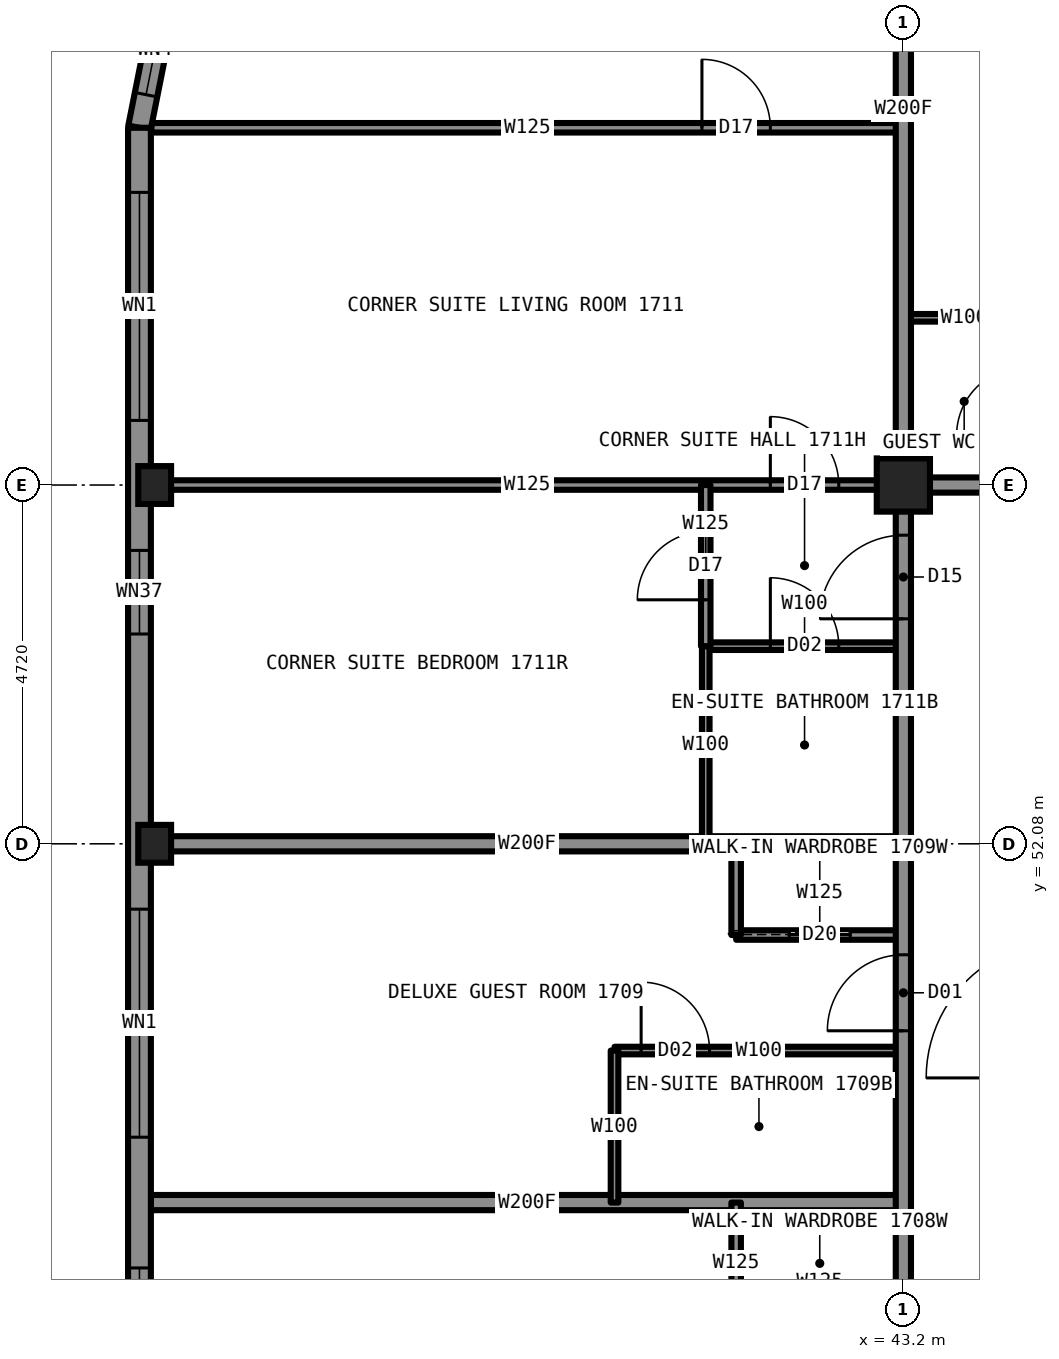
"""IFC4 building model, lengths in metres.
Left out: names, types, materials, properties, quantities, classifications, styles, units other than length and angle.
Written with IfcOpenShell. Run it as: python <this file> out.ifc"""

import sys

from ifc_helpers import new_model, si_unit, direction, frame, frame_2d, origin, origin_2d, place, context, subcontext, project, spatial, rectangle, hollow_rectangle, i_section, extrude, element, fill, save


model = new_model("IFC4")
c1 = context("Model", 3, precision=1e-05, world=origin(), true_north=direction((0.0, 1.0)))
c2 = subcontext(c1, "Body", "Model", "MODEL_VIEW")
j1 = project(units=[si_unit("LENGTHUNIT", "METRE"), si_unit("PLANEANGLEUNIT", "RADIAN")], contexts=[c1])
p1 = place(None, origin())
s1 = spatial("IfcSite", under=j1, at=p1, CompositionType="ELEMENT")
p2 = place(p1, origin())
s2 = spatial("IfcBuilding", under=s1, at=p2, CompositionType="ELEMENT")
p3 = place(p2, frame((0.0, 0.0, 60.0)))
s3 = spatial("IfcBuildingStorey", under=s2, at=p3, CompositionType="ELEMENT", Elevation=60.0)
for number, where, z_axis, x_axis in (
    (1, (33.35, 52.08, 0.0), (0.0, 0.0, 1.0), (1.0, 0.0, 0.0)),
    (2, (33.35, 56.8, 0.0), (0.0, 0.0, 1.0), (1.0, 0.0, 0.0)),
):
    element("IfcColumn", number, at=place(p3, frame(where, z_axis=z_axis, x_axis=x_axis)), inside=s3, PredefinedType="COLUMN", context=c2, shape_type="SweptSolid", body=[
        extrude(i_section(OverallWidth=0.432, OverallDepth=0.498, WebThickness=0.056, FlangeThickness=0.089, at=origin_2d()), origin(), (0.0, 0.0, 1.0), 3.5),
    ])
p4 = place(p3, frame((43.2, 56.8, 0.0), z_axis=(0.0, 0.0, 1.0), x_axis=(1.0, 0.0, 0.0)))
e3 = element("IfcColumn", 3, at=p4, inside=s3, PredefinedType="COLUMN", context=c2, shape_type="SweptSolid", body=[
    extrude(hollow_rectangle(XDim=0.7, YDim=0.7, WallThickness=0.06, at=origin_2d()), origin(), (0.0, 0.0, 1.0), 3.5),
])
p5 = place(p3, frame((43.2, 56.8, 0.0), z_axis=(0.0, 0.0, 1.0), x_axis=(1.0, 0.0, 0.0)))
e4 = element("IfcWall", 4, at=p5, inside=s3, PredefinedType="PARTITIONING", context=c2, shape_type="SweptSolid", body=[
    extrude(rectangle(XDim=23.6, YDim=0.2, at=frame_2d((11.8, 0.0))), origin(), (0.0, 0.0, 1.0), 3.33),
])
p6 = place(p5, frame((1.85, 0.0, 0.0)))
e5 = element("IfcOpeningElement", 5, at=p6, cuts=e4, PredefinedType="OPENING", context=c2, shape_type="SweptSolid", body=[
    extrude(rectangle(XDim=1.1, YDim=2.2, at=frame_2d((0.55, 1.1))), frame((0.0, 0.11, 0.0), z_axis=(0.0, -1.0, 0.0), x_axis=(1.0, 0.0, 0.0)), (0.0, 0.0, 1.0), 0.22),
])
p7 = place(p5, frame((17.16, 0.0, 0.0)))
e6 = element("IfcOpeningElement", 6, at=p7, cuts=e4, PredefinedType="OPENING", context=c2, shape_type="SweptSolid", body=[
    extrude(rectangle(XDim=1.0, YDim=2.2, at=frame_2d((0.5, 1.1))), frame((0.0, 0.11, 0.0), z_axis=(0.0, -1.0, 0.0), x_axis=(1.0, 0.0, 0.0)), (0.0, 0.0, 1.0), 0.22),
])
p8 = place(p3, frame((33.3, 56.8, 0.0), z_axis=(0.0, 0.0, 1.0), x_axis=(1.0, 0.0, 0.0)))
e7 = element("IfcWall", 7, at=p8, inside=s3, PredefinedType="PARTITIONING", context=c2, shape_type="SweptSolid", body=[
    extrude(rectangle(XDim=9.9, YDim=0.125, at=frame_2d((4.95, 0.0))), origin(), (0.0, 0.0, 1.0), 2.573),
])
p9 = place(p8, frame((8.15, 0.0, 0.0)))
e8 = element("IfcOpeningElement", 8, at=p9, cuts=e7, PredefinedType="OPENING", context=c2, shape_type="SweptSolid", body=[
    extrude(rectangle(XDim=0.9, YDim=2.2, at=frame_2d((0.45, 1.1))), frame((0.0, 0.073, 0.0), z_axis=(0.0, -1.0, 0.0), x_axis=(1.0, 0.0, 0.0)), (0.0, 0.0, 1.0), 0.145),
])
p10 = place(p3, frame((43.2, 59.0, 0.0), z_axis=(0.0, 0.0, 1.0), x_axis=(1.0, 0.0, 0.0)))
e9 = element("IfcWall", 9, at=p10, inside=s3, PredefinedType="PARTITIONING", context=c2, shape_type="SweptSolid", body=[
    extrude(rectangle(XDim=1.6, YDim=0.1, at=frame_2d((0.8, 0.0))), origin(), (0.0, 0.0, 1.0), 3.33),
])
p11 = place(p3, frame((33.306, 61.5, 0.0), z_axis=(0.0, 0.0, 1.0), x_axis=(1.0, 0.0, 0.0)))
e10 = element("IfcWall", 10, at=p11, inside=s3, PredefinedType="PARTITIONING", context=c2, shape_type="SweptSolid", body=[
    extrude(rectangle(XDim=9.894, YDim=0.125, at=frame_2d((4.947, 0.0))), origin(), (0.0, 0.0, 1.0), 3.33),
])
p12 = place(p11, frame((7.244, 0.0, 0.0)))
e11 = element("IfcOpeningElement", 11, at=p12, cuts=e10, PredefinedType="OPENING", context=c2, shape_type="SweptSolid", body=[
    extrude(rectangle(XDim=0.9, YDim=2.2, at=frame_2d((0.45, 1.1))), frame((0.0, 0.073, 0.0), z_axis=(0.0, -1.0, 0.0), x_axis=(1.0, 0.0, 0.0)), (0.0, 0.0, 1.0), 0.145),
])
p13 = place(p3, frame((33.3, 47.36, 0.0), z_axis=(0.0, 0.0, 1.0), x_axis=(1.0, 0.0, 0.0)))
e12 = element("IfcWall", 12, at=p13, inside=s3, PredefinedType="PARTITIONING", context=c2, shape_type="SweptSolid", body=[
    extrude(rectangle(XDim=9.9, YDim=0.2, at=frame_2d((4.95, 0.0))), origin(), (0.0, 0.0, 1.0), 2.723),
])
p14 = place(p3, frame((39.4, 49.36, 0.0), z_axis=(0.0, 0.0, 1.0), x_axis=(1.0, 0.0, 0.0)))
e13 = element("IfcWall", 13, at=p14, inside=s3, PredefinedType="PARTITIONING", context=c2, shape_type="SweptSolid", body=[
    extrude(rectangle(XDim=3.8, YDim=0.1, at=frame_2d((1.9, 0.0))), origin(), (0.0, 0.0, 1.0), 3.33),
])
p15 = place(p14, frame((0.35, 0.0, 0.0)))
e14 = element("IfcOpeningElement", 14, at=p15, cuts=e13, PredefinedType="OPENING", context=c2, shape_type="SweptSolid", body=[
    extrude(rectangle(XDim=0.9, YDim=2.1, at=frame_2d((0.45, 1.05))), frame((0.0, 0.06, 0.0), z_axis=(0.0, -1.0, 0.0), x_axis=(1.0, 0.0, 0.0)), (0.0, 0.0, 1.0), 0.12),
])
p16 = place(p3, frame((41.0, 50.88, 0.0), z_axis=(0.0, 0.0, 1.0), x_axis=(1.0, 0.0, 0.0)))
e15 = element("IfcWall", 15, at=p16, inside=s3, PredefinedType="PARTITIONING", context=c2, shape_type="SweptSolid", body=[
    extrude(rectangle(XDim=2.2, YDim=0.125, at=frame_2d((1.1, 0.0))), origin(), (0.0, 0.0, 1.0), 3.33),
])
p17 = place(p16, frame((0.7, 0.0, 0.0)))
e16 = element("IfcOpeningElement", 16, at=p17, cuts=e15, PredefinedType="OPENING", context=c2, shape_type="SweptSolid", body=[
    extrude(rectangle(XDim=0.8, YDim=2.1, at=frame_2d((0.4, 1.05))), frame((0.0, 0.073, 0.0), z_axis=(0.0, -1.0, 0.0), x_axis=(1.0, 0.0, 0.0)), (0.0, 0.0, 1.0), 0.145),
])
p18 = place(p3, frame((33.3, 52.08, 0.0), z_axis=(0.0, 0.0, 1.0), x_axis=(1.0, 0.0, 0.0)))
e17 = element("IfcWall", 17, at=p18, inside=s3, PredefinedType="PARTITIONING", context=c2, shape_type="SweptSolid", body=[
    extrude(rectangle(XDim=9.9, YDim=0.2, at=frame_2d((4.95, 0.0))), origin(), (0.0, 0.0, 1.0), 2.573),
])
p19 = place(p3, frame((40.6, 54.68, 0.0), z_axis=(0.0, 0.0, 1.0), x_axis=(1.0, 0.0, 0.0)))
e18 = element("IfcWall", 18, at=p19, inside=s3, PredefinedType="PARTITIONING", context=c2, shape_type="SweptSolid", body=[
    extrude(rectangle(XDim=2.6, YDim=0.1, at=frame_2d((1.3, 0.0))), origin(), (0.0, 0.0, 1.0), 3.33),
])
p20 = place(p19, frame((0.85, 0.0, 0.0)))
e19 = element("IfcOpeningElement", 19, at=p20, cuts=e18, PredefinedType="OPENING", context=c2, shape_type="SweptSolid", body=[
    extrude(rectangle(XDim=0.9, YDim=2.1, at=frame_2d((0.45, 1.05))), frame((0.0, 0.06, 0.0), z_axis=(0.0, -1.0, 0.0), x_axis=(1.0, 0.0, 0.0)), (0.0, 0.0, 1.0), 0.12),
])
p21 = place(p3, frame((43.2, 33.22, 0.0), z_axis=(0.0, 0.0, 1.0), x_axis=(0.0, 1.0, 0.0)))
e20 = element("IfcWall", 20, at=p21, inside=s3, PredefinedType="PARTITIONING", context=c2, shape_type="SweptSolid", body=[
    extrude(rectangle(XDim=23.58, YDim=0.2, at=frame_2d((11.79, 0.0))), origin(), (0.0, 0.0, 1.0), 3.33),
])
p22 = place(p21, frame((7.7, 0.0, 0.0)))
e21 = element("IfcOpeningElement", 21, at=p22, cuts=e20, PredefinedType="OPENING", context=c2, shape_type="SweptSolid", body=[
    extrude(rectangle(XDim=1.0, YDim=2.2, at=frame_2d((0.5, 1.1))), frame((0.0, 0.11, 0.0), z_axis=(0.0, -1.0, 0.0), x_axis=(1.0, 0.0, 0.0)), (0.0, 0.0, 1.0), 0.22),
])
p23 = place(p21, frame((16.4, 0.0, 0.0)))
e22 = element("IfcOpeningElement", 22, at=p23, cuts=e20, PredefinedType="OPENING", context=c2, shape_type="SweptSolid", body=[
    extrude(rectangle(XDim=1.0, YDim=2.2, at=frame_2d((0.5, 1.1))), frame((0.0, 0.11, 0.0), z_axis=(0.0, -1.0, 0.0), x_axis=(1.0, 0.0, 0.0)), (0.0, 0.0, 1.0), 0.22),
])
p24 = place(p21, frame((21.82, 0.0, 0.0)))
e23 = element("IfcOpeningElement", 23, at=p24, cuts=e20, PredefinedType="OPENING", context=c2, shape_type="SweptSolid", body=[
    extrude(rectangle(XDim=1.1, YDim=2.2, at=frame_2d((0.55, 1.1))), frame((0.0, 0.11, 0.0), z_axis=(0.0, -1.0, 0.0), x_axis=(1.0, 0.0, 0.0)), (0.0, 0.0, 1.0), 0.22),
])
p25 = place(p21, frame((0.64, 0.0, 0.0)))
e24 = element("IfcOpeningElement", 24, at=p25, cuts=e20, PredefinedType="OPENING", context=c2, shape_type="SweptSolid", body=[
    extrude(rectangle(XDim=1.1, YDim=2.2, at=frame_2d((0.55, 1.1))), frame((0.0, 0.11, 0.0), z_axis=(0.0, -1.0, 0.0), x_axis=(1.0, 0.0, 0.0)), (0.0, 0.0, 1.0), 0.22),
])
p26 = place(p3, frame((43.2, 56.8, 0.0), z_axis=(0.0, 0.0, 1.0), x_axis=(0.0, 1.0, 0.0)))
e25 = element("IfcWall", 25, at=p26, inside=s3, PredefinedType="PARTITIONING", context=c2, shape_type="SweptSolid", body=[
    extrude(rectangle(XDim=9.9, YDim=0.2, at=frame_2d((4.95, 0.0))), origin(), (0.0, 0.0, 1.0), 2.573),
])
p27 = place(p3, frame((41.0, 45.76, 0.0), z_axis=(0.0, 0.0, 1.0), x_axis=(0.0, 1.0, 0.0)))
e26 = element("IfcWall", 26, at=p27, inside=s3, PredefinedType="PARTITIONING", context=c2, shape_type="SweptSolid", body=[
    extrude(rectangle(XDim=1.6, YDim=0.125, at=frame_2d((0.8, 0.0))), origin(), (0.0, 0.0, 1.0), 3.33),
])
p28 = place(p3, frame((41.0, 50.88, 0.0), z_axis=(0.0, 0.0, 1.0), x_axis=(0.0, 1.0, 0.0)))
e27 = element("IfcWall", 27, at=p28, inside=s3, PredefinedType="PARTITIONING", context=c2, shape_type="SweptSolid", body=[
    extrude(rectangle(XDim=1.2, YDim=0.125, at=frame_2d((0.6, 0.0))), origin(), (0.0, 0.0, 1.0), 3.33),
])
p29 = place(p3, frame((40.6, 52.08, 0.0), z_axis=(0.0, 0.0, 1.0), x_axis=(0.0, 1.0, 0.0)))
e28 = element("IfcWall", 28, at=p29, inside=s3, PredefinedType="PARTITIONING", context=c2, shape_type="SweptSolid", body=[
    extrude(rectangle(XDim=2.6, YDim=0.1, at=frame_2d((1.3, 0.0))), origin(), (0.0, 0.0, 1.0), 3.33),
])
p30 = place(p3, frame((40.6, 54.68, 0.0), z_axis=(0.0, 0.0, 1.0), x_axis=(0.0, 1.0, 0.0)))
e29 = element("IfcWall", 29, at=p30, inside=s3, PredefinedType="PARTITIONING", context=c2, shape_type="SweptSolid", body=[
    extrude(rectangle(XDim=2.12, YDim=0.125, at=frame_2d((1.06, 0.0))), origin(), (0.0, 0.0, 1.0), 3.33),
])
p31 = place(p30, frame((0.61, 0.0, 0.0)))
e30 = element("IfcOpeningElement", 30, at=p31, cuts=e29, PredefinedType="OPENING", context=c2, shape_type="SweptSolid", body=[
    extrude(rectangle(XDim=0.9, YDim=2.2, at=frame_2d((0.45, 1.1))), frame((0.0, 0.073, 0.0), z_axis=(0.0, -1.0, 0.0), x_axis=(1.0, 0.0, 0.0)), (0.0, 0.0, 1.0), 0.145),
])
p32 = place(p3, frame((39.4, 47.36, 0.0), z_axis=(0.0, 0.0, 1.0), x_axis=(0.0, 1.0, 0.0)))
e31 = element("IfcWall", 31, at=p32, inside=s3, PredefinedType="PARTITIONING", context=c2, shape_type="SweptSolid", body=[
    extrude(rectangle(XDim=2.0, YDim=0.1, at=frame_2d((1.0, 0.0))), origin(), (0.0, 0.0, 1.0), 3.33),
])
p33 = place(p3, frame((33.557, 63.547, 0.0), z_axis=(0.0, 0.0, 1.0), x_axis=(-0.195081421501, -0.980787050784, 0.0)))
e32 = element("IfcWall", 32, at=p33, inside=s3, PredefinedType="SOLIDWALL", context=c2, shape_type="SweptSolid", body=[
    extrude(rectangle(XDim=2.087, YDim=0.3, at=frame_2d((1.044, 0.0))), origin(), (0.0, 0.0, 1.0), 3.33),
])
p34 = place(p33, frame((0.444, 0.0, 0.5)))
e33 = element("IfcOpeningElement", 33, at=p34, cuts=e32, PredefinedType="OPENING", context=c2, shape_type="SweptSolid", body=[
    extrude(rectangle(XDim=1.2, YDim=2.0, at=frame_2d((0.6, 1.0))), frame((0.0, 0.16, 0.0), z_axis=(0.0, -1.0, 0.0), x_axis=(1.0, 0.0, 0.0)), (0.0, 0.0, 1.0), 0.32),
])
p35 = place(p3, frame((33.15, 61.5, 0.0), z_axis=(0.0, 0.0, 1.0), x_axis=(0.0, -1.0, 0.0)))
e34 = element("IfcWall", 34, at=p35, inside=s3, PredefinedType="SOLIDWALL", context=c2, shape_type="SweptSolid", body=[
    extrude(rectangle(XDim=33.0, YDim=0.3, at=frame_2d((16.5, 0.0))), origin(), (0.0, 0.0, 1.0), 2.83),
])
p36 = place(p35, frame((0.85, 0.0, 0.5)))
e35 = element("IfcOpeningElement", 35, at=p36, cuts=e34, PredefinedType="OPENING", context=c2, shape_type="SweptSolid", body=[
    extrude(rectangle(XDim=3.0, YDim=2.0, at=frame_2d((1.5, 1.0))), frame((0.0, 0.16, 0.0), z_axis=(0.0, -1.0, 0.0), x_axis=(1.0, 0.0, 0.0)), (0.0, 0.0, 1.0), 0.32),
])
p37 = place(p35, frame((5.56, 0.0, 0.5)))
e36 = element("IfcOpeningElement", 36, at=p37, cuts=e34, PredefinedType="OPENING", context=c2, shape_type="SweptSolid", body=[
    extrude(rectangle(XDim=3.0, YDim=2.0, at=frame_2d((1.5, 1.0))), frame((0.0, 0.16, 0.0), z_axis=(0.0, -1.0, 0.0), x_axis=(1.0, 0.0, 0.0)), (0.0, 0.0, 1.0), 0.32),
])
p38 = place(p35, frame((10.28, 0.0, 0.5)))
e37 = element("IfcOpeningElement", 37, at=p38, cuts=e34, PredefinedType="OPENING", context=c2, shape_type="SweptSolid", body=[
    extrude(rectangle(XDim=1.2, YDim=1.7, at=frame_2d((0.6, 0.85))), frame((0.0, 0.16, 0.0), z_axis=(0.0, -1.0, 0.0), x_axis=(1.0, 0.0, 0.0)), (0.0, 0.0, 1.0), 0.32),
])
p39 = place(p35, frame((15.0, 0.0, 0.5)))
e38 = element("IfcOpeningElement", 38, at=p39, cuts=e34, PredefinedType="OPENING", context=c2, shape_type="SweptSolid", body=[
    extrude(rectangle(XDim=3.0, YDim=2.0, at=frame_2d((1.5, 1.0))), frame((0.0, 0.16, 0.0), z_axis=(0.0, -1.0, 0.0), x_axis=(1.0, 0.0, 0.0)), (0.0, 0.0, 1.0), 0.32),
])
p40 = place(p35, frame((21.52, 0.0, 0.5)))
e39 = element("IfcOpeningElement", 39, at=p40, cuts=e34, PredefinedType="OPENING", context=c2, shape_type="SweptSolid", body=[
    extrude(rectangle(XDim=1.2, YDim=1.7, at=frame_2d((0.6, 0.85))), frame((0.0, 0.16, 0.0), z_axis=(0.0, -1.0, 0.0), x_axis=(1.0, 0.0, 0.0)), (0.0, 0.0, 1.0), 0.32),
])
p41 = place(p35, frame((24.44, 0.0, 0.5)))
e40 = element("IfcOpeningElement", 40, at=p41, cuts=e34, PredefinedType="OPENING", context=c2, shape_type="SweptSolid", body=[
    extrude(rectangle(XDim=3.0, YDim=2.0, at=frame_2d((1.5, 1.0))), frame((0.0, 0.16, 0.0), z_axis=(0.0, -1.0, 0.0), x_axis=(1.0, 0.0, 0.0)), (0.0, 0.0, 1.0), 0.32),
])
p42 = place(p35, frame((29.15, 0.0, 0.5)))
e41 = element("IfcOpeningElement", 41, at=p42, cuts=e34, PredefinedType="OPENING", context=c2, shape_type="SweptSolid", body=[
    extrude(rectangle(XDim=3.0, YDim=2.0, at=frame_2d((1.5, 1.0))), frame((0.0, 0.16, 0.0), z_axis=(0.0, -1.0, 0.0), x_axis=(1.0, 0.0, 0.0)), (0.0, 0.0, 1.0), 0.32),
])
p43 = place(p35, frame((11.48, 0.0, 0.5)))
e42 = element("IfcOpeningElement", 42, at=p43, cuts=e34, PredefinedType="OPENING", context=c2, shape_type="SweptSolid", body=[
    extrude(rectangle(XDim=0.6, YDim=0.8, at=frame_2d((0.3, 0.4))), frame((0.0, 0.16, 0.0), z_axis=(0.0, -1.0, 0.0), x_axis=(1.0, 0.0, 0.0)), (0.0, 0.0, 1.0), 0.32),
])
p44 = place(p35, frame((20.87, 0.0, 0.5)))
e43 = element("IfcOpeningElement", 43, at=p44, cuts=e34, PredefinedType="OPENING", context=c2, shape_type="SweptSolid", body=[
    extrude(rectangle(XDim=0.6, YDim=0.8, at=frame_2d((0.3, 0.4))), frame((0.0, 0.16, 0.0), z_axis=(0.0, -1.0, 0.0), x_axis=(1.0, 0.0, 0.0)), (0.0, 0.0, 1.0), 0.32),
])
p45 = place(p23, origin())
e44 = element("IfcDoor", 44, at=p45, inside=s3, OperationType="SINGLE_SWING_LEFT", PredefinedType="DOOR", context=c2, shape_type="SweptSolid", body=[
    extrude(rectangle(XDim=1.0, YDim=2.2, at=frame_2d((0.5, 1.1))), frame((0.0, 0.025, 0.0), z_axis=(0.0, -1.0, 0.0), x_axis=(1.0, 0.0, 0.0)), (0.0, 0.0, 1.0), 0.05),
])
fill(e22, e44)
p46 = place(p15, origin())
e45 = element("IfcDoor", 45, at=p46, inside=s3, OperationType="SINGLE_SWING_RIGHT", PredefinedType="DOOR", context=c2, shape_type="SweptSolid", body=[
    extrude(rectangle(XDim=0.9, YDim=2.1, at=frame_2d((0.45, 1.05))), frame((0.0, 0.025, 0.0), z_axis=(0.0, -1.0, 0.0), x_axis=(1.0, 0.0, 0.0)), (0.0, 0.0, 1.0), 0.05),
])
fill(e14, e45)
p47 = place(p17, origin())
e46 = element("IfcDoor", 46, at=p47, inside=s3, OperationType="SLIDING_TO_LEFT", PredefinedType="DOOR", context=c2, shape_type="SweptSolid", body=[
    extrude(rectangle(XDim=0.8, YDim=2.1, at=frame_2d((0.4, 1.05))), frame((0.0, 0.025, 0.0), z_axis=(0.0, -1.0, 0.0), x_axis=(1.0, 0.0, 0.0)), (0.0, 0.0, 1.0), 0.05),
])
fill(e16, e46)
p48 = place(p9, origin())
e47 = element("IfcDoor", 47, at=p48, inside=s3, OperationType="SINGLE_SWING_LEFT", PredefinedType="DOOR", context=c2, shape_type="SweptSolid", body=[
    extrude(rectangle(XDim=0.9, YDim=2.2, at=frame_2d((0.45, 1.1))), frame((0.0, 0.025, 0.0), z_axis=(0.0, -1.0, 0.0), x_axis=(1.0, 0.0, 0.0)), (0.0, 0.0, 1.0), 0.05),
])
fill(e8, e47)
p49 = place(p20, origin())
e48 = element("IfcDoor", 48, at=p49, inside=s3, OperationType="SINGLE_SWING_RIGHT", PredefinedType="DOOR", context=c2, shape_type="SweptSolid", body=[
    extrude(rectangle(XDim=0.9, YDim=2.1, at=frame_2d((0.45, 1.05))), frame((0.0, 0.025, 0.0), z_axis=(0.0, -1.0, 0.0), x_axis=(1.0, 0.0, 0.0)), (0.0, 0.0, 1.0), 0.05),
])
fill(e19, e48)
p50 = place(p24, origin())
e49 = element("IfcDoor", 49, at=p50, inside=s3, OperationType="SINGLE_SWING_LEFT", PredefinedType="DOOR", context=c2, shape_type="SweptSolid", body=[
    extrude(rectangle(XDim=1.1, YDim=2.2, at=frame_2d((0.55, 1.1))), frame((0.0, 0.025, 0.0), z_axis=(0.0, -1.0, 0.0), x_axis=(1.0, 0.0, 0.0)), (0.0, 0.0, 1.0), 0.05),
])
fill(e23, e49)
p51 = place(p12, origin())
e50 = element("IfcDoor", 50, at=p51, inside=s3, OperationType="SINGLE_SWING_LEFT", PredefinedType="DOOR", context=c2, shape_type="SweptSolid", body=[
    extrude(rectangle(XDim=0.9, YDim=2.2, at=frame_2d((0.45, 1.1))), frame((0.0, 0.025, 0.0), z_axis=(0.0, -1.0, 0.0), x_axis=(1.0, 0.0, 0.0)), (0.0, 0.0, 1.0), 0.05),
])
fill(e11, e50)
p52 = place(p31, origin())
e51 = element("IfcDoor", 51, at=p52, inside=s3, OperationType="SINGLE_SWING_LEFT", PredefinedType="DOOR", context=c2, shape_type="SweptSolid", body=[
    extrude(rectangle(XDim=0.9, YDim=2.2, at=frame_2d((0.45, 1.1))), frame((0.0, 0.025, 0.0), z_axis=(0.0, -1.0, 0.0), x_axis=(1.0, 0.0, 0.0)), (0.0, 0.0, 1.0), 0.05),
])
fill(e30, e51)
p53 = place(p34, origin())
e52 = element("IfcWindow", 52, at=p53, inside=s3, PartitioningType="SINGLE_PANEL", PredefinedType="WINDOW", context=c2, shape_type="SweptSolid", body=[
    extrude(rectangle(XDim=1.2, YDim=2.0, at=frame_2d((0.6, 1.0))), frame((0.0, 0.03, 0.0), z_axis=(0.0, -1.0, 0.0), x_axis=(1.0, 0.0, 0.0)), (0.0, 0.0, 1.0), 0.06),
])
fill(e33, e52)
p54 = place(p36, origin())
e53 = element("IfcWindow", 53, at=p54, inside=s3, PartitioningType="SINGLE_PANEL", PredefinedType="WINDOW", context=c2, shape_type="SweptSolid", body=[
    extrude(rectangle(XDim=3.0, YDim=2.0, at=frame_2d((1.5, 1.0))), frame((0.0, 0.03, 0.0), z_axis=(0.0, -1.0, 0.0), x_axis=(1.0, 0.0, 0.0)), (0.0, 0.0, 1.0), 0.06),
])
fill(e35, e53)
p55 = place(p37, origin())
e54 = element("IfcWindow", 54, at=p55, inside=s3, PartitioningType="SINGLE_PANEL", PredefinedType="WINDOW", context=c2, shape_type="SweptSolid", body=[
    extrude(rectangle(XDim=3.0, YDim=2.0, at=frame_2d((1.5, 1.0))), frame((0.0, 0.03, 0.0), z_axis=(0.0, -1.0, 0.0), x_axis=(1.0, 0.0, 0.0)), (0.0, 0.0, 1.0), 0.06),
])
fill(e36, e54)
p56 = place(p38, origin())
e55 = element("IfcWindow", 55, at=p56, inside=s3, PartitioningType="SINGLE_PANEL", PredefinedType="WINDOW", context=c2, shape_type="SweptSolid", body=[
    extrude(rectangle(XDim=1.2, YDim=1.7, at=frame_2d((0.6, 0.85))), frame((0.0, 0.03, 0.0), z_axis=(0.0, -1.0, 0.0), x_axis=(1.0, 0.0, 0.0)), (0.0, 0.0, 1.0), 0.06),
])
fill(e37, e55)
p57 = place(p39, origin())
e56 = element("IfcWindow", 56, at=p57, inside=s3, PartitioningType="SINGLE_PANEL", PredefinedType="WINDOW", context=c2, shape_type="SweptSolid", body=[
    extrude(rectangle(XDim=3.0, YDim=2.0, at=frame_2d((1.5, 1.0))), frame((0.0, 0.03, 0.0), z_axis=(0.0, -1.0, 0.0), x_axis=(1.0, 0.0, 0.0)), (0.0, 0.0, 1.0), 0.06),
])
fill(e38, e56)
p58 = place(p43, origin())
e57 = element("IfcWindow", 57, at=p58, inside=s3, PartitioningType="SINGLE_PANEL", PredefinedType="WINDOW", context=c2, shape_type="SweptSolid", body=[
    extrude(rectangle(XDim=0.6, YDim=0.8, at=frame_2d((0.3, 0.4))), frame((0.0, 0.03, 0.0), z_axis=(0.0, -1.0, 0.0), x_axis=(1.0, 0.0, 0.0)), (0.0, 0.0, 1.0), 0.06),
])
fill(e42, e57)
save(model, sys.argv[1])
